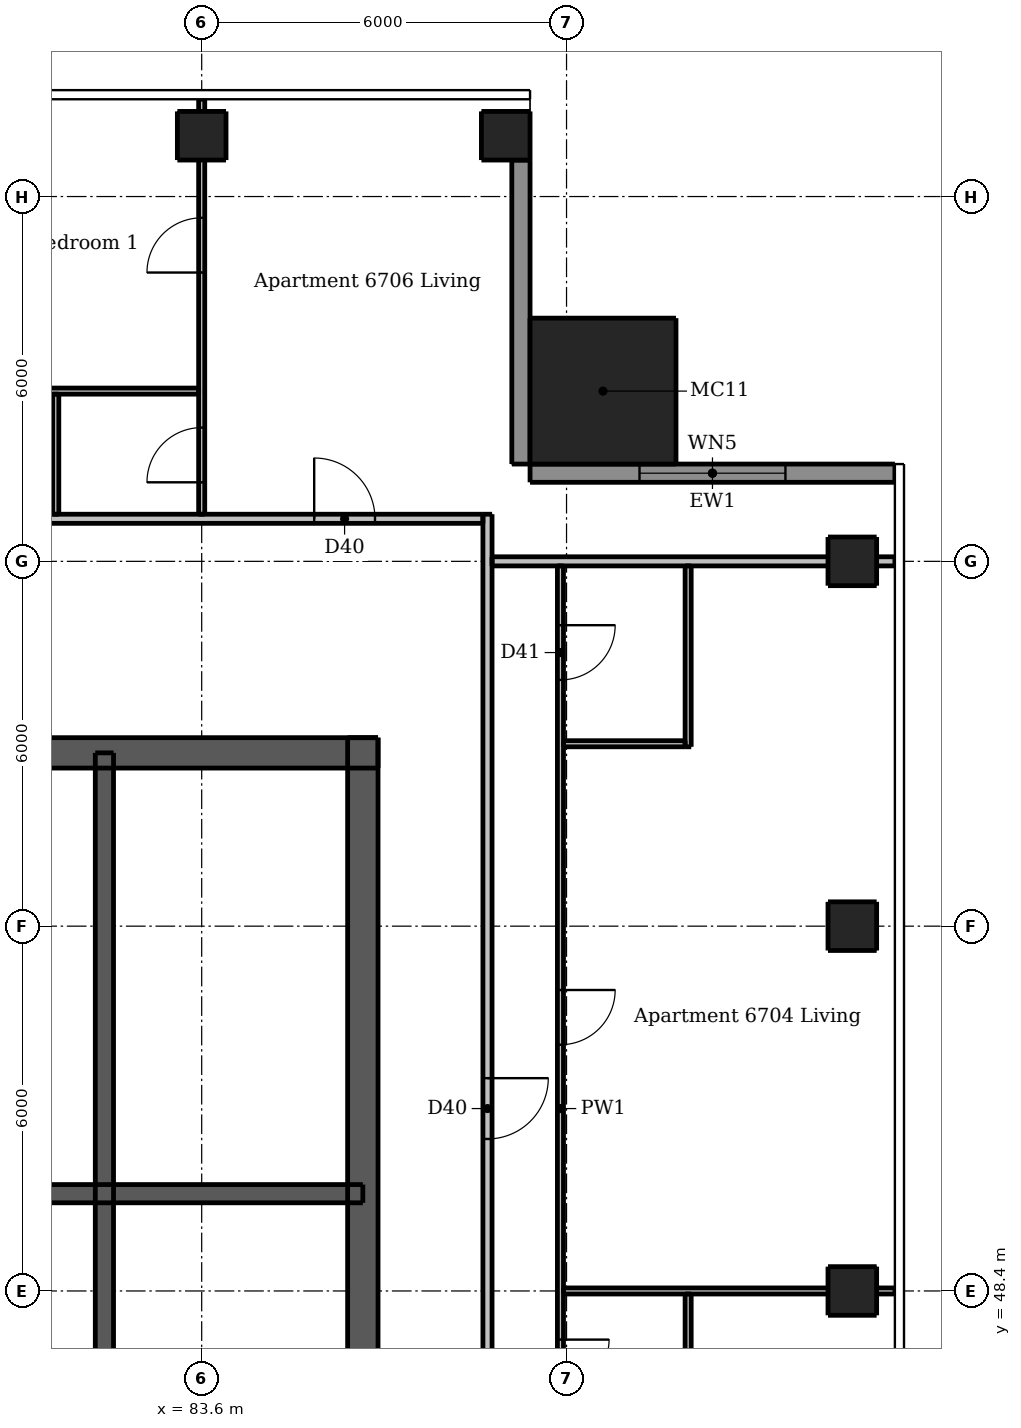
"""IFC4 building model, lengths in metres.
Left out: names, types, materials, properties, quantities, classifications, styles, units other than length and angle.
Written with IfcOpenShell. Run it as: python <this file> out.ifc"""

import sys

from ifc_helpers import new_model, si_unit, direction, frame, frame_2d, origin, origin_2d, place, context, subcontext, project, spatial, rectangle, extrude, element, fill, save


model = new_model("IFC4")
c1 = context("Model", 3, precision=1e-05, world=origin(), true_north=direction((0.0, 1.0)))
c2 = subcontext(c1, "Body", "Model", "MODEL_VIEW")
j1 = project(units=[si_unit("LENGTHUNIT", "METRE"), si_unit("PLANEANGLEUNIT", "RADIAN")], contexts=[c1])
p1 = place(None, origin())
s1 = spatial("IfcSite", under=j1, at=p1, CompositionType="ELEMENT")
p2 = place(p1, origin())
s2 = spatial("IfcBuilding", under=s1, at=p2, CompositionType="ELEMENT")
p3 = place(p2, frame((0.0, 0.0, 252.1)))
s3 = spatial("IfcBuildingStorey", under=s2, at=p3, CompositionType="ELEMENT", Elevation=252.1)
p4 = place(p3, frame((62.5, 57.25, 0.0), z_axis=(0.0, 0.0, 1.0), x_axis=(1.0, 0.0, 0.0)))
e1 = element("IfcWall", 1, at=p4, inside=s3, PredefinedType="SHEAR", context=c2, shape_type="SweptSolid", body=[
    extrude(rectangle(XDim=24.0, YDim=0.5, at=frame_2d((12.0, 0.0))), origin(), (0.0, 0.0, 1.0), 3.05),
])
p5 = place(p4, frame((21.025, 0.0, 0.0)))
e2 = element("IfcOpeningElement", 2, at=p5, cuts=e1, PredefinedType="OPENING", context=c2, shape_type="SweptSolid", body=[
    extrude(rectangle(XDim=1.1, YDim=2.1, at=frame_2d((0.55, 1.05))), frame((0.0, 0.26, 0.0), z_axis=(0.0, -1.0, 0.0), x_axis=(1.0, 0.0, 0.0)), (0.0, 0.0, 1.0), 0.52),
])
p6 = place(p4, frame((1.875, 0.0, 0.0)))
e3 = element("IfcOpeningElement", 3, at=p6, cuts=e1, PredefinedType="OPENING", context=c2, shape_type="SweptSolid", body=[
    extrude(rectangle(XDim=1.1, YDim=2.1, at=frame_2d((0.55, 1.05))), frame((0.0, 0.26, 0.0), z_axis=(0.0, -1.0, 0.0), x_axis=(1.0, 0.0, 0.0)), (0.0, 0.0, 1.0), 0.52),
])
p7 = place(p4, frame((6.038, 0.0, 0.0)))
e4 = element("IfcOpeningElement", 4, at=p7, cuts=e1, PredefinedType="OPENING", context=c2, shape_type="SweptSolid", body=[
    extrude(rectangle(XDim=0.9, YDim=2.1, at=frame_2d((0.45, 1.05))), frame((0.0, 0.26, 0.0), z_axis=(0.0, -1.0, 0.0), x_axis=(1.0, 0.0, 0.0)), (0.0, 0.0, 1.0), 0.52),
])
p8 = place(p4, frame((10.448, 0.0, 0.0)))
e5 = element("IfcOpeningElement", 5, at=p8, cuts=e1, PredefinedType="OPENING", context=c2, shape_type="SweptSolid", body=[
    extrude(rectangle(XDim=0.9, YDim=2.1, at=frame_2d((0.45, 1.05))), frame((0.0, 0.26, 0.0), z_axis=(0.0, -1.0, 0.0), x_axis=(1.0, 0.0, 0.0)), (0.0, 0.0, 1.0), 0.52),
])
p9 = place(p4, frame((15.96, 0.0, 0.0)))
e6 = element("IfcOpeningElement", 6, at=p9, cuts=e1, PredefinedType="OPENING", context=c2, shape_type="SweptSolid", body=[
    extrude(rectangle(XDim=0.9, YDim=2.1, at=frame_2d((0.45, 1.05))), frame((0.0, 0.26, 0.0), z_axis=(0.0, -1.0, 0.0), x_axis=(1.0, 0.0, 0.0)), (0.0, 0.0, 1.0), 0.52),
])
p10 = place(p3, frame((86.25, 33.5, 0.0), z_axis=(0.0, 0.0, 1.0), x_axis=(0.0, 1.0, 0.0)))
e7 = element("IfcWall", 7, at=p10, inside=s3, PredefinedType="SHEAR", context=c2, shape_type="SweptSolid", body=[
    extrude(rectangle(XDim=24.0, YDim=0.5, at=frame_2d((12.0, 0.0))), origin(), (0.0, 0.0, 1.0), 3.05),
])
p11 = place(p10, frame((11.2, 0.0, 0.0)))
e8 = element("IfcOpeningElement", 8, at=p11, cuts=e7, PredefinedType="OPENING", context=c2, shape_type="SweptSolid", body=[
    extrude(rectangle(XDim=1.6, YDim=2.1, at=frame_2d((0.8, 1.05))), frame((0.0, 0.26, 0.0), z_axis=(0.0, -1.0, 0.0), x_axis=(1.0, 0.0, 0.0)), (0.0, 0.0, 1.0), 0.52),
])
p12 = place(p3, frame((62.75, 50.0, 0.0), z_axis=(0.0, 0.0, 1.0), x_axis=(1.0, 0.0, 0.0)))
e9 = element("IfcWall", 9, at=p12, inside=s3, PredefinedType="SHEAR", context=c2, shape_type="SweptSolid", body=[
    extrude(rectangle(XDim=23.5, YDim=0.3, at=frame_2d((11.75, 0.0))), origin(), (0.0, 0.0, 1.0), 3.05),
])
p13 = place(p3, frame((82.0, 47.1, 0.0), z_axis=(0.0, 0.0, 1.0), x_axis=(0.0, 1.0, 0.0)))
e10 = element("IfcWall", 10, at=p13, inside=s3, PredefinedType="SHEAR", context=c2, shape_type="SweptSolid", body=[
    extrude(rectangle(XDim=10.15, YDim=0.3, at=frame_2d((5.075, 0.0))), origin(), (0.0, 0.0, 1.0), 3.05),
])
for number, where, z_axis, x_axis in (
    (11, (94.3, 48.4, 0.0), (0.0, 0.0, 1.0), (1.0, 0.0, 0.0)),
    (12, (94.3, 54.4, 0.0), (0.0, 0.0, 1.0), (1.0, 0.0, 0.0)),
    (13, (94.3, 60.4, 0.0), (0.0, 0.0, 1.0), (1.0, 0.0, 0.0)),
    (14, (83.6, 67.4, 0.0), (0.0, 0.0, 1.0), (1.0, 0.0, 0.0)),
    (15, (88.6, 67.4, 0.0), (0.0, 0.0, 1.0), (1.0, 0.0, 0.0)),
):
    element("IfcColumn", number, at=place(p3, frame(where, z_axis=z_axis, x_axis=x_axis)), inside=s3, PredefinedType="COLUMN", context=c2, shape_type="SweptSolid", body=[
        extrude(rectangle(XDim=0.8, YDim=0.8, at=origin_2d()), origin(), (0.0, 0.0, 1.0), 3.05),
    ])
p14 = place(p3, frame((90.2, 63.2, 0.0), z_axis=(0.0, 0.0, 1.0), x_axis=(1.0, 0.0, 0.0)))
e16 = element("IfcColumn", 16, at=p14, inside=s3, PredefinedType="COLUMN", context=c2, shape_type="SweptSolid", body=[
    extrude(rectangle(XDim=2.4, YDim=2.4, at=origin_2d()), origin(), (0.0, 0.0, 1.0), 3.3),
])
p15 = place(p3, frame((95.0, 61.85, 0.0), z_axis=(0.0, 0.0, 1.0), x_axis=(-1.0, 0.0, 0.0)))
e17 = element("IfcWall", 17, at=p15, inside=s3, PredefinedType="SOLIDWALL", context=c2, shape_type="SweptSolid", body=[
    extrude(rectangle(XDim=6.0, YDim=0.3, at=frame_2d((3.0, 0.0))), origin(), (0.0, 0.0, 1.0), 3.05),
])
p16 = place(p15, frame((1.8, 0.0, 0.15)))
e18 = element("IfcOpeningElement", 18, at=p16, cuts=e17, PredefinedType="OPENING", context=c2, shape_type="SweptSolid", body=[
    extrude(rectangle(XDim=2.4, YDim=2.1, at=frame_2d((1.2, 1.05))), frame((0.0, 0.16, 0.0), z_axis=(0.0, -1.0, 0.0), x_axis=(1.0, 0.0, 0.0)), (0.0, 0.0, 1.0), 0.32),
])
p17 = place(p3, frame((88.85, 62.0, 0.0), z_axis=(0.0, 0.0, 1.0), x_axis=(0.0, 1.0, 0.0)))
e19 = element("IfcWall", 19, at=p17, inside=s3, PredefinedType="SOLIDWALL", context=c2, shape_type="SweptSolid", body=[
    extrude(rectangle(XDim=5.0, YDim=0.3, at=frame_2d((2.5, 0.0))), origin(), (0.0, 0.0, 1.0), 3.05),
])
p18 = place(p3, frame((81.2, 61.175, 0.0), z_axis=(0.0, 0.0, 1.0), x_axis=(0.0, 1.0, 0.0)))
e20 = element("IfcWall", 20, at=p18, inside=s3, PredefinedType="PARTITIONING", context=c2, shape_type="SweptSolid", body=[
    extrude(rectangle(XDim=1.975, YDim=0.1, at=frame_2d((0.987, 0.0))), origin(), (0.0, 0.0, 1.0), 3.05),
])
p19 = place(p3, frame((83.6, 61.175, 0.0), z_axis=(0.0, 0.0, 1.0), x_axis=(0.0, 1.0, 0.0)))
e21 = element("IfcWall", 21, at=p19, inside=s3, PredefinedType="PARTITIONING", context=c2, shape_type="SweptSolid", body=[
    extrude(rectangle(XDim=6.825, YDim=0.1, at=frame_2d((3.413, 0.0))), origin(), (0.0, 0.0, 1.0), 2.516),
])
p20 = place(p19, frame((0.525, 0.0, 0.0)))
e22 = element("IfcOpeningElement", 22, at=p20, cuts=e21, PredefinedType="OPENING", context=c2, shape_type="SweptSolid", body=[
    extrude(rectangle(XDim=0.9, YDim=2.1, at=frame_2d((0.45, 1.05))), frame((0.0, 0.06, 0.0), z_axis=(0.0, -1.0, 0.0), x_axis=(1.0, 0.0, 0.0)), (0.0, 0.0, 1.0), 0.12),
])
p21 = place(p19, frame((3.975, 0.0, 0.0)))
e23 = element("IfcOpeningElement", 23, at=p21, cuts=e21, PredefinedType="OPENING", context=c2, shape_type="SweptSolid", body=[
    extrude(rectangle(XDim=0.9, YDim=2.1, at=frame_2d((0.45, 1.05))), frame((0.0, 0.06, 0.0), z_axis=(0.0, -1.0, 0.0), x_axis=(1.0, 0.0, 0.0)), (0.0, 0.0, 1.0), 0.12),
])
p22 = place(p3, frame((89.5, 60.325, 0.0), z_axis=(0.0, 0.0, 1.0), x_axis=(0.0, -1.0, 0.0)))
e24 = element("IfcWall", 24, at=p22, inside=s3, PredefinedType="PARTITIONING", context=c2, shape_type="SweptSolid", body=[
    extrude(rectangle(XDim=17.85, YDim=0.1, at=frame_2d((8.925, 0.0))), origin(), (0.0, 0.0, 1.0), 3.05),
])
p23 = place(p22, frame((6.975, 0.0, 0.0)))
e25 = element("IfcOpeningElement", 25, at=p23, cuts=e24, PredefinedType="OPENING", context=c2, shape_type="SweptSolid", body=[
    extrude(rectangle(XDim=0.9, YDim=2.1, at=frame_2d((0.45, 1.05))), frame((0.0, 0.06, 0.0), z_axis=(0.0, -1.0, 0.0), x_axis=(1.0, 0.0, 0.0)), (0.0, 0.0, 1.0), 0.12),
])
p24 = place(p22, frame((0.975, 0.0, 0.0)))
e26 = element("IfcOpeningElement", 26, at=p24, cuts=e24, PredefinedType="OPENING", context=c2, shape_type="SweptSolid", body=[
    extrude(rectangle(XDim=0.9, YDim=2.1, at=frame_2d((0.45, 1.05))), frame((0.0, 0.06, 0.0), z_axis=(0.0, -1.0, 0.0), x_axis=(1.0, 0.0, 0.0)), (0.0, 0.0, 1.0), 0.12),
])
p25 = place(p22, frame((15.675, 0.0, 0.0)))
e27 = element("IfcOpeningElement", 27, at=p25, cuts=e24, PredefinedType="OPENING", context=c2, shape_type="SweptSolid", body=[
    extrude(rectangle(XDim=0.9, YDim=2.1, at=frame_2d((0.45, 1.05))), frame((0.0, 0.06, 0.0), z_axis=(0.0, -1.0, 0.0), x_axis=(1.0, 0.0, 0.0)), (0.0, 0.0, 1.0), 0.12),
])
p26 = place(p22, frame((12.725, 0.0, 0.0)))
e28 = element("IfcOpeningElement", 28, at=p26, cuts=e24, PredefinedType="OPENING", context=c2, shape_type="SweptSolid", body=[
    extrude(rectangle(XDim=0.8, YDim=2.1, at=frame_2d((0.4, 1.05))), frame((0.0, 0.06, 0.0), z_axis=(0.0, -1.0, 0.0), x_axis=(1.0, 0.0, 0.0)), (0.0, 0.0, 1.0), 0.12),
])
p27 = place(p3, frame((91.6, 45.95, 0.0), z_axis=(0.0, 0.0, 1.0), x_axis=(0.0, 1.0, 0.0)))
e29 = element("IfcWall", 29, at=p27, inside=s3, PredefinedType="PARTITIONING", context=c2, shape_type="SweptSolid", body=[
    extrude(rectangle(XDim=2.4, YDim=0.1, at=frame_2d((1.2, 0.0))), origin(), (0.0, 0.0, 1.0), 3.05),
])
p28 = place(p3, frame((91.6, 57.35, 0.0), z_axis=(0.0, 0.0, 1.0), x_axis=(0.0, 1.0, 0.0)))
e30 = element("IfcWall", 30, at=p28, inside=s3, PredefinedType="PARTITIONING", context=c2, shape_type="SweptSolid", body=[
    extrude(rectangle(XDim=2.975, YDim=0.1, at=frame_2d((1.487, 0.0))), origin(), (0.0, 0.0, 1.0), 3.05),
])
p29 = place(p3, frame((83.55, 63.2, 0.0), z_axis=(0.0, 0.0, 1.0), x_axis=(-1.0, 0.0, 0.0)))
e31 = element("IfcWall", 31, at=p29, inside=s3, PredefinedType="PARTITIONING", context=c2, shape_type="SweptSolid", body=[
    extrude(rectangle(XDim=5.875, YDim=0.1, at=frame_2d((2.938, 0.0))), origin(), (0.0, 0.0, 1.0), 3.05),
])
p30 = place(p29, frame((3.75, 0.0, 0.0)))
e32 = element("IfcOpeningElement", 32, at=p30, cuts=e31, PredefinedType="OPENING", context=c2, shape_type="SweptSolid", body=[
    extrude(rectangle(XDim=0.8, YDim=2.1, at=frame_2d((0.4, 1.05))), frame((0.0, 0.06, 0.0), z_axis=(0.0, -1.0, 0.0), x_axis=(1.0, 0.0, 0.0)), (0.0, 0.0, 1.0), 0.12),
])
p31 = place(p3, frame((89.55, 57.4, 0.0), z_axis=(0.0, 0.0, 1.0), x_axis=(1.0, 0.0, 0.0)))
e33 = element("IfcWall", 33, at=p31, inside=s3, PredefinedType="PARTITIONING", context=c2, shape_type="SweptSolid", body=[
    extrude(rectangle(XDim=2.0, YDim=0.1, at=frame_2d((1.0, 0.0))), origin(), (0.0, 0.0, 1.0), 3.05),
])
p32 = place(p3, frame((89.55, 48.4, 0.0), z_axis=(0.0, 0.0, 1.0), x_axis=(1.0, 0.0, 0.0)))
e34 = element("IfcWall", 34, at=p32, inside=s3, PredefinedType="PARTITIONING", context=c2, shape_type="SweptSolid", body=[
    extrude(rectangle(XDim=5.45, YDim=0.1, at=frame_2d((2.725, 0.0))), origin(), (0.0, 0.0, 1.0), 2.59),
])
p33 = place(p3, frame((88.3, 61.175, 0.0), z_axis=(0.0, 0.0, 1.0), x_axis=(0.0, -1.0, 0.0)))
e35 = element("IfcWall", 35, at=p33, inside=s3, PredefinedType="PARTITIONING", context=c2, shape_type="SweptSolid", body=[
    extrude(rectangle(XDim=29.4, YDim=0.15, at=frame_2d((14.7, 0.0))), origin(), (0.0, 0.0, 1.0), 3.05),
])
p34 = place(p33, frame((27.025, 0.0, 0.0)))
e36 = element("IfcOpeningElement", 36, at=p34, cuts=e35, PredefinedType="OPENING", context=c2, shape_type="SweptSolid", body=[
    extrude(rectangle(XDim=1.0, YDim=2.1, at=frame_2d((0.5, 1.05))), frame((0.0, 0.085, 0.0), z_axis=(0.0, -1.0, 0.0), x_axis=(1.0, 0.0, 0.0)), (0.0, 0.0, 1.0), 0.17),
])
p35 = place(p33, frame((9.275, 0.0, 0.0)))
e37 = element("IfcOpeningElement", 37, at=p35, cuts=e35, PredefinedType="OPENING", context=c2, shape_type="SweptSolid", body=[
    extrude(rectangle(XDim=1.0, YDim=2.1, at=frame_2d((0.5, 1.05))), frame((0.0, 0.085, 0.0), z_axis=(0.0, -1.0, 0.0), x_axis=(1.0, 0.0, 0.0)), (0.0, 0.0, 1.0), 0.17),
])
p36 = place(p3, frame((58.975, 61.1, 0.0), z_axis=(0.0, 0.0, 1.0), x_axis=(1.0, 0.0, 0.0)))
e38 = element("IfcWall", 38, at=p36, inside=s3, PredefinedType="PARTITIONING", context=c2, shape_type="SweptSolid", body=[
    extrude(rectangle(XDim=29.25, YDim=0.15, at=frame_2d((14.625, 0.0))), origin(), (0.0, 0.0, 1.0), 3.05),
])
p37 = place(p36, frame((9.125, 0.0, 0.0)))
e39 = element("IfcOpeningElement", 39, at=p37, cuts=e38, PredefinedType="OPENING", context=c2, shape_type="SweptSolid", body=[
    extrude(rectangle(XDim=1.0, YDim=2.1, at=frame_2d((0.5, 1.05))), frame((0.0, 0.085, 0.0), z_axis=(0.0, -1.0, 0.0), x_axis=(1.0, 0.0, 0.0)), (0.0, 0.0, 1.0), 0.17),
])
p38 = place(p36, frame((26.475, 0.0, 0.0)))
e40 = element("IfcOpeningElement", 40, at=p38, cuts=e38, PredefinedType="OPENING", context=c2, shape_type="SweptSolid", body=[
    extrude(rectangle(XDim=1.0, YDim=2.1, at=frame_2d((0.5, 1.05))), frame((0.0, 0.085, 0.0), z_axis=(0.0, -1.0, 0.0), x_axis=(1.0, 0.0, 0.0)), (0.0, 0.0, 1.0), 0.17),
])
p39 = place(p3, frame((88.375, 60.4, 0.0), z_axis=(0.0, 0.0, 1.0), x_axis=(1.0, 0.0, 0.0)))
e41 = element("IfcWall", 41, at=p39, inside=s3, PredefinedType="PARTITIONING", context=c2, shape_type="SweptSolid", body=[
    extrude(rectangle(XDim=6.625, YDim=0.15, at=frame_2d((3.312, 0.0))), origin(), (0.0, 0.0, 1.0), 2.647),
])
p40 = place(p16, origin())
e42 = element("IfcWindow", 42, at=p40, inside=s3, PartitioningType="DOUBLE_PANEL_VERTICAL", PredefinedType="WINDOW", context=c2, shape_type="SweptSolid", body=[
    extrude(rectangle(XDim=2.4, YDim=2.1, at=frame_2d((1.2, 1.05))), frame((0.0, 0.03, 0.0), z_axis=(0.0, -1.0, 0.0), x_axis=(1.0, 0.0, 0.0)), (0.0, 0.0, 1.0), 0.06),
])
fill(e18, e42)
p41 = place(p5, origin())
e43 = element("IfcDoor", 43, at=p41, inside=s3, OperationType="SINGLE_SWING_RIGHT", PredefinedType="DOOR", context=c2, shape_type="SweptSolid", body=[
    extrude(rectangle(XDim=1.1, YDim=2.1, at=frame_2d((0.55, 1.05))), frame((0.0, -0.188, 0.0), z_axis=(0.0, -1.0, 0.0), x_axis=(1.0, 0.0, 0.0)), (0.0, 0.0, 1.0), 0.05),
])
fill(e2, e43)
p42 = place(p35, origin())
e44 = element("IfcDoor", 44, at=p42, inside=s3, OperationType="SINGLE_SWING_LEFT", PredefinedType="DOOR", context=c2, shape_type="SweptSolid", body=[
    extrude(rectangle(XDim=1.0, YDim=2.1, at=frame_2d((0.5, 1.05))), frame((0.0, 0.025, 0.0), z_axis=(0.0, -1.0, 0.0), x_axis=(1.0, 0.0, 0.0)), (0.0, 0.0, 1.0), 0.05),
])
fill(e37, e44)
p43 = place(p23, origin())
e45 = element("IfcDoor", 45, at=p43, inside=s3, OperationType="SINGLE_SWING_LEFT", PredefinedType="DOOR", context=c2, shape_type="SweptSolid", body=[
    extrude(rectangle(XDim=0.9, YDim=2.1, at=frame_2d((0.45, 1.05))), frame((0.0, 0.025, 0.0), z_axis=(0.0, -1.0, 0.0), x_axis=(1.0, 0.0, 0.0)), (0.0, 0.0, 1.0), 0.05),
])
fill(e25, e45)
p44 = place(p24, origin())
e46 = element("IfcDoor", 46, at=p44, inside=s3, OperationType="SINGLE_SWING_LEFT", PredefinedType="DOOR", context=c2, shape_type="SweptSolid", body=[
    extrude(rectangle(XDim=0.9, YDim=2.1, at=frame_2d((0.45, 1.05))), frame((0.0, 0.025, 0.0), z_axis=(0.0, -1.0, 0.0), x_axis=(1.0, 0.0, 0.0)), (0.0, 0.0, 1.0), 0.05),
])
fill(e26, e46)
p45 = place(p26, origin())
e47 = element("IfcDoor", 47, at=p45, inside=s3, OperationType="SINGLE_SWING_LEFT", PredefinedType="DOOR", context=c2, shape_type="SweptSolid", body=[
    extrude(rectangle(XDim=0.8, YDim=2.1, at=frame_2d((0.4, 1.05))), frame((0.0, 0.025, 0.0), z_axis=(0.0, -1.0, 0.0), x_axis=(1.0, 0.0, 0.0)), (0.0, 0.0, 1.0), 0.05),
])
fill(e28, e47)
p46 = place(p38, origin())
e48 = element("IfcDoor", 48, at=p46, inside=s3, OperationType="SINGLE_SWING_LEFT", PredefinedType="DOOR", context=c2, shape_type="SweptSolid", body=[
    extrude(rectangle(XDim=1.0, YDim=2.1, at=frame_2d((0.5, 1.05))), frame((0.0, 0.025, 0.0), z_axis=(0.0, -1.0, 0.0), x_axis=(1.0, 0.0, 0.0)), (0.0, 0.0, 1.0), 0.05),
])
fill(e40, e48)
p47 = place(p20, origin())
e49 = element("IfcDoor", 49, at=p47, inside=s3, OperationType="SINGLE_SWING_LEFT", PredefinedType="DOOR", context=c2, shape_type="SweptSolid", body=[
    extrude(rectangle(XDim=0.9, YDim=2.1, at=frame_2d((0.45, 1.05))), frame((0.0, 0.025, 0.0), z_axis=(0.0, -1.0, 0.0), x_axis=(1.0, 0.0, 0.0)), (0.0, 0.0, 1.0), 0.05),
])
fill(e22, e49)
p48 = place(p21, origin())
e50 = element("IfcDoor", 50, at=p48, inside=s3, OperationType="SINGLE_SWING_LEFT", PredefinedType="DOOR", context=c2, shape_type="SweptSolid", body=[
    extrude(rectangle(XDim=0.9, YDim=2.1, at=frame_2d((0.45, 1.05))), frame((0.0, 0.025, 0.0), z_axis=(0.0, -1.0, 0.0), x_axis=(1.0, 0.0, 0.0)), (0.0, 0.0, 1.0), 0.05),
])
fill(e23, e50)
save(model, sys.argv[1])
